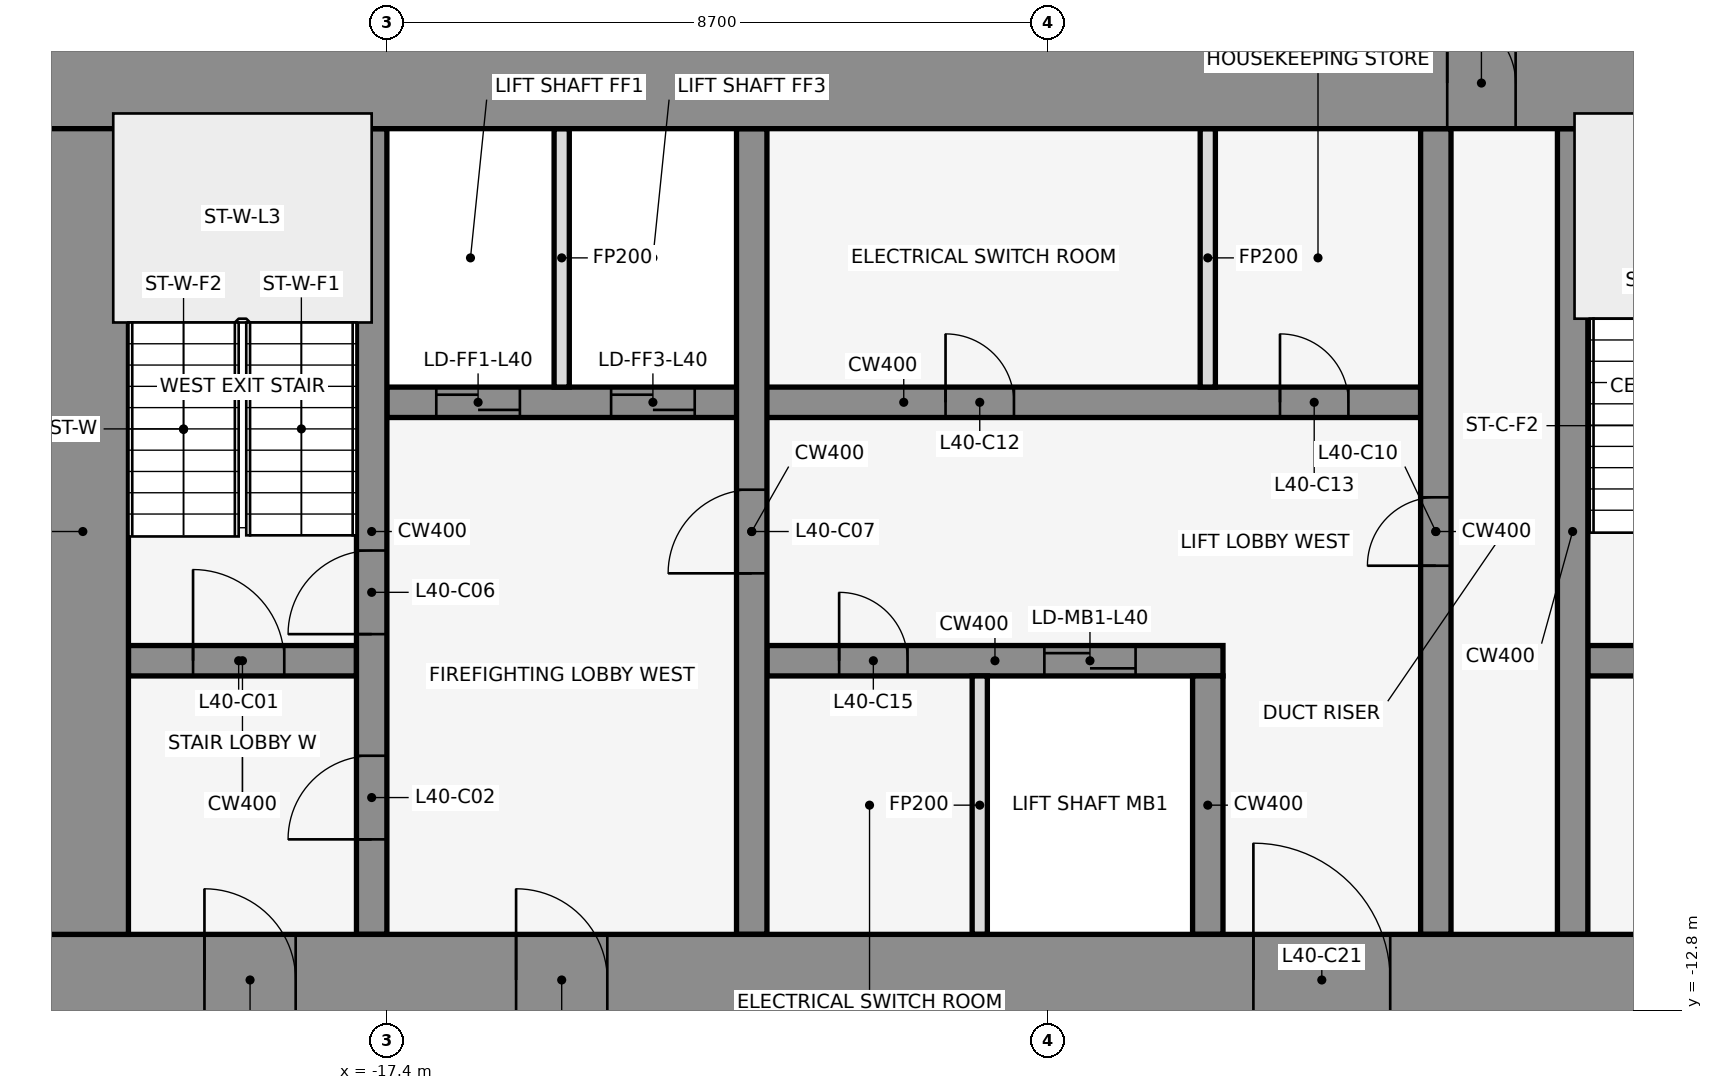
"""IFC4 building model, lengths in metres.
Left out: names, types, materials, properties, quantities, classifications, styles, units other than length and angle.
Written with IfcOpenShell. Run it as: python <this file> out.ifc"""

import sys

from ifc_helpers import new_model, si_unit, direction, frame, frame_2d, origin, place, context, subcontext, project, spatial, rectangle, extrude, element, fill, save


model = new_model("IFC4")
c1 = context("Model", 3, precision=1e-05, world=origin(), true_north=direction((0.0, 1.0)))
c2 = subcontext(c1, "Body", "Model", "MODEL_VIEW")
j1 = project(units=[si_unit("LENGTHUNIT", "METRE"), si_unit("PLANEANGLEUNIT", "RADIAN")], contexts=[c1])
p1 = place(None, origin())
s1 = spatial("IfcSite", under=j1, at=p1, CompositionType="ELEMENT")
p2 = place(p1, origin())
s2 = spatial("IfcBuilding", under=s1, at=p2, CompositionType="ELEMENT")
p3 = place(p2, frame((0.0, 0.0, 181.4)))
s3 = spatial("IfcBuildingStorey", under=s2, at=p3, CompositionType="ELEMENT", Elevation=181.4)
for number, where, z_axis, x_axis in (
    (1, (-0.068, -0.105, 0.0), (0.0, 0.0, 1.0), (-0.84, 0.543, 0.0)),
    (2, (-14.599, 1.08, 0.0), (0.0, 0.0, 1.0), (-0.84, -0.543, 0.0)),
):
    element("IfcWall", number, at=place(p3, frame(where, z_axis=z_axis, x_axis=x_axis)), inside=s3, PredefinedType="STANDARD", context=c2, shape_type="SweptSolid", body=[
        extrude(rectangle(XDim=2.183, YDim=0.25, at=frame_2d((1.091, 0.0))), origin(), (0.0, 0.0, 1.0), 3.9),
    ])
p4 = place(p3, frame((-20.8, -8.2, 0.0), z_axis=(0.0, 0.0, 1.0), x_axis=(1.0, 0.0, 0.0)))
e3 = element("IfcWall", 3, at=p4, inside=s3, PredefinedType="SHEAR", context=c2, shape_type="SweptSolid", body=[
    extrude(rectangle(XDim=3.0, YDim=0.4, at=frame_2d((1.5, 0.0))), origin(), (0.0, 0.0, 1.0), 4.1),
])
p5 = place(p4, frame((0.85, 0.0, 0.0)))
e4 = element("IfcOpeningElement", 4, at=p5, cuts=e3, PredefinedType="OPENING", context=c2, shape_type="SweptSolid", body=[
    extrude(rectangle(XDim=1.2, YDim=2.1, at=frame_2d((0.6, 1.05))), frame((0.0, 0.212, 0.0), z_axis=(0.0, -1.0, 0.0), x_axis=(1.0, 0.0, 0.0)), (0.0, 0.0, 1.0), 0.424),
])
p6 = place(p3, frame((-12.4, -8.2, 0.0), z_axis=(0.0, 0.0, 1.0), x_axis=(1.0, 0.0, 0.0)))
e5 = element("IfcWall", 5, at=p6, inside=s3, PredefinedType="SHEAR", context=c2, shape_type="SweptSolid", body=[
    extrude(rectangle(XDim=6.0, YDim=0.4, at=frame_2d((3.0, 0.0))), origin(), (0.0, 0.0, 1.0), 4.1),
])
p7 = place(p6, frame((3.65, 0.0, 0.0)))
e6 = element("IfcOpeningElement", 6, at=p7, cuts=e5, PredefinedType="OPENING", context=c2, shape_type="SweptSolid", body=[
    extrude(rectangle(XDim=1.2, YDim=2.1, at=frame_2d((0.6, 1.05))), frame((0.0, 0.212, 0.0), z_axis=(0.0, -1.0, 0.0), x_axis=(1.0, 0.0, 0.0)), (0.0, 0.0, 1.0), 0.424),
])
p8 = place(p6, frame((0.95, 0.0, 0.0)))
e7 = element("IfcOpeningElement", 7, at=p8, cuts=e5, PredefinedType="OPENING", context=c2, shape_type="SweptSolid", body=[
    extrude(rectangle(XDim=0.9, YDim=2.1, at=frame_2d((0.45, 1.05))), frame((0.0, 0.212, 0.0), z_axis=(0.0, -1.0, 0.0), x_axis=(1.0, 0.0, 0.0)), (0.0, 0.0, 1.0), 0.424),
])
p9 = place(p3, frame((-1.6, -8.2, 0.0), z_axis=(0.0, 0.0, 1.0), x_axis=(1.0, 0.0, 0.0)))
e8 = element("IfcWall", 8, at=p9, inside=s3, PredefinedType="SHEAR", context=c2, shape_type="SweptSolid", body=[
    extrude(rectangle(XDim=3.2, YDim=0.4, at=frame_2d((1.6, 0.0))), origin(), (0.0, 0.0, 1.0), 4.1),
])
p10 = place(p9, frame((1.05, 0.0, 0.0)))
e9 = element("IfcOpeningElement", 9, at=p10, cuts=e8, PredefinedType="OPENING", context=c2, shape_type="SweptSolid", body=[
    extrude(rectangle(XDim=1.2, YDim=2.1, at=frame_2d((0.6, 1.05))), frame((0.0, 0.212, 0.0), z_axis=(0.0, -1.0, 0.0), x_axis=(1.0, 0.0, 0.0)), (0.0, 0.0, 1.0), 0.424),
])
p11 = place(p3, frame((-17.4, -4.8, 0.0), z_axis=(0.0, 0.0, 1.0), x_axis=(1.0, 0.0, 0.0)))
e10 = element("IfcWall", 10, at=p11, inside=s3, PredefinedType="SHEAR", context=c2, shape_type="SweptSolid", body=[
    extrude(rectangle(XDim=13.6, YDim=0.4, at=frame_2d((6.8, 0.0))), origin(), (0.0, 0.0, 1.0), 4.1),
])
p12 = place(p11, frame((0.65, 0.0, 0.0)))
e11 = element("IfcOpeningElement", 11, at=p12, cuts=e10, PredefinedType="OPENING", context=c2, shape_type="SweptSolid", body=[
    extrude(rectangle(XDim=1.1, YDim=2.1, at=frame_2d((0.55, 1.05))), frame((0.0, 0.212, 0.0), z_axis=(0.0, -1.0, 0.0), x_axis=(1.0, 0.0, 0.0)), (0.0, 0.0, 1.0), 0.424),
])
p13 = place(p11, frame((2.95, 0.0, 0.0)))
e12 = element("IfcOpeningElement", 12, at=p13, cuts=e10, PredefinedType="OPENING", context=c2, shape_type="SweptSolid", body=[
    extrude(rectangle(XDim=1.1, YDim=2.1, at=frame_2d((0.55, 1.05))), frame((0.0, 0.212, 0.0), z_axis=(0.0, -1.0, 0.0), x_axis=(1.0, 0.0, 0.0)), (0.0, 0.0, 1.0), 0.424),
])
p14 = place(p11, frame((7.35, 0.0, 0.0)))
e13 = element("IfcOpeningElement", 13, at=p14, cuts=e10, PredefinedType="OPENING", context=c2, shape_type="SweptSolid", body=[
    extrude(rectangle(XDim=0.9, YDim=2.1, at=frame_2d((0.45, 1.05))), frame((0.0, 0.212, 0.0), z_axis=(0.0, -1.0, 0.0), x_axis=(1.0, 0.0, 0.0)), (0.0, 0.0, 1.0), 0.424),
])
p15 = place(p11, frame((11.75, 0.0, 0.0)))
e14 = element("IfcOpeningElement", 14, at=p15, cuts=e10, PredefinedType="OPENING", context=c2, shape_type="SweptSolid", body=[
    extrude(rectangle(XDim=0.9, YDim=2.1, at=frame_2d((0.45, 1.05))), frame((0.0, 0.212, 0.0), z_axis=(0.0, -1.0, 0.0), x_axis=(1.0, 0.0, 0.0)), (0.0, 0.0, 1.0), 0.424),
])
p16 = place(p3, frame((-17.6, -11.8, 0.0), z_axis=(0.0, 0.0, 1.0), x_axis=(0.0, 1.0, 0.0)))
e15 = element("IfcWall", 15, at=p16, inside=s3, PredefinedType="SHEAR", context=c2, shape_type="SweptSolid", body=[
    extrude(rectangle(XDim=10.6, YDim=0.4, at=frame_2d((5.3, 0.0))), origin(), (0.0, 0.0, 1.0), 4.1),
])
p17 = place(p16, frame((1.25, 0.0, 0.0)))
e16 = element("IfcOpeningElement", 16, at=p17, cuts=e15, PredefinedType="OPENING", context=c2, shape_type="SweptSolid", body=[
    extrude(rectangle(XDim=1.1, YDim=2.1, at=frame_2d((0.55, 1.05))), frame((0.0, 0.212, 0.0), z_axis=(0.0, -1.0, 0.0), x_axis=(1.0, 0.0, 0.0)), (0.0, 0.0, 1.0), 0.424),
])
p18 = place(p16, frame((3.95, 0.0, 0.0)))
e17 = element("IfcOpeningElement", 17, at=p18, cuts=e15, PredefinedType="OPENING", context=c2, shape_type="SweptSolid", body=[
    extrude(rectangle(XDim=1.1, YDim=2.1, at=frame_2d((0.55, 1.05))), frame((0.0, 0.212, 0.0), z_axis=(0.0, -1.0, 0.0), x_axis=(1.0, 0.0, 0.0)), (0.0, 0.0, 1.0), 0.424),
])
p19 = place(p3, frame((-15.1, -4.6, 0.0), z_axis=(0.0, 0.0, 1.0), x_axis=(0.0, 1.0, 0.0)))
e18 = element("IfcWall", 18, at=p19, inside=s3, PredefinedType="PARTITIONING", context=c2, shape_type="SweptSolid", body=[
    extrude(rectangle(XDim=3.4, YDim=0.2, at=frame_2d((1.7, 0.0))), origin(), (0.0, 0.0, 1.0), 2.79),
])
p20 = place(p3, frame((-12.6, -11.8, 0.0), z_axis=(0.0, 0.0, 1.0), x_axis=(0.0, 1.0, 0.0)))
e19 = element("IfcWall", 19, at=p20, inside=s3, PredefinedType="SHEAR", context=c2, shape_type="SweptSolid", body=[
    extrude(rectangle(XDim=10.6, YDim=0.4, at=frame_2d((5.3, 0.0))), origin(), (0.0, 0.0, 1.0), 4.1),
])
p21 = place(p20, frame((4.75, 0.0, 0.0)))
e20 = element("IfcOpeningElement", 20, at=p21, cuts=e19, PredefinedType="OPENING", context=c2, shape_type="SweptSolid", body=[
    extrude(rectangle(XDim=1.1, YDim=2.1, at=frame_2d((0.55, 1.05))), frame((0.0, 0.212, 0.0), z_axis=(0.0, -1.0, 0.0), x_axis=(1.0, 0.0, 0.0)), (0.0, 0.0, 1.0), 0.424),
])
p22 = place(p3, frame((-9.6, -11.8, 0.0), z_axis=(0.0, 0.0, 1.0), x_axis=(0.0, 1.0, 0.0)))
e21 = element("IfcWall", 21, at=p22, inside=s3, PredefinedType="PARTITIONING", context=c2, shape_type="SweptSolid", body=[
    extrude(rectangle(XDim=3.4, YDim=0.2, at=frame_2d((1.7, 0.0))), origin(), (0.0, 0.0, 1.0), 2.79),
])
p23 = place(p3, frame((-6.6, -11.8, 0.0), z_axis=(0.0, 0.0, 1.0), x_axis=(0.0, 1.0, 0.0)))
e22 = element("IfcWall", 22, at=p23, inside=s3, PredefinedType="SHEAR", context=c2, shape_type="SweptSolid", body=[
    extrude(rectangle(XDim=3.4, YDim=0.4, at=frame_2d((1.7, 0.0))), origin(), (0.0, 0.0, 1.0), 4.1),
])
p24 = place(p3, frame((-6.6, -4.6, 0.0), z_axis=(0.0, 0.0, 1.0), x_axis=(0.0, 1.0, 0.0)))
e23 = element("IfcWall", 23, at=p24, inside=s3, PredefinedType="PARTITIONING", context=c2, shape_type="SweptSolid", body=[
    extrude(rectangle(XDim=3.4, YDim=0.2, at=frame_2d((1.7, 0.0))), origin(), (0.0, 0.0, 1.0), 2.79),
])
p25 = place(p3, frame((-3.6, -11.8, 0.0), z_axis=(0.0, 0.0, 1.0), x_axis=(0.0, 1.0, 0.0)))
e24 = element("IfcWall", 24, at=p25, inside=s3, PredefinedType="SHEAR", context=c2, shape_type="SweptSolid", body=[
    extrude(rectangle(XDim=10.6, YDim=0.4, at=frame_2d((5.3, 0.0))), origin(), (0.0, 0.0, 1.0), 4.1),
])
p26 = place(p25, frame((4.85, 0.0, 0.0)))
e25 = element("IfcOpeningElement", 25, at=p26, cuts=e24, PredefinedType="OPENING", context=c2, shape_type="SweptSolid", body=[
    extrude(rectangle(XDim=0.9, YDim=2.1, at=frame_2d((0.45, 1.05))), frame((0.0, 0.212, 0.0), z_axis=(0.0, -1.0, 0.0), x_axis=(1.0, 0.0, 0.0)), (0.0, 0.0, 1.0), 0.424),
])
p27 = place(p3, frame((-1.8, -11.8, 0.0), z_axis=(0.0, 0.0, 1.0), x_axis=(0.0, 1.0, 0.0)))
e26 = element("IfcWall", 26, at=p27, inside=s3, PredefinedType="SHEAR", context=c2, shape_type="SweptSolid", body=[
    extrude(rectangle(XDim=10.6, YDim=0.4, at=frame_2d((5.3, 0.0))), origin(), (0.0, 0.0, 1.0), 4.1),
])
p28 = place(p3, frame((-22.0, -0.6, 0.0), z_axis=(0.0, 0.0, 1.0), x_axis=(1.0, 0.0, 0.0)))
e27 = element("IfcWall", 27, at=p28, inside=s3, PredefinedType="SHEAR", context=c2, shape_type="SweptSolid", body=[
    extrude(rectangle(XDim=44.0, YDim=1.2, at=frame_2d((22.0, 0.0))), origin(), (0.0, 0.0, 1.0), 4.1),
])
p29 = place(p28, frame((18.55, 0.0, 0.0)))
e28 = element("IfcOpeningElement", 28, at=p29, cuts=e27, PredefinedType="OPENING", context=c2, shape_type="SweptSolid", body=[
    extrude(rectangle(XDim=0.9, YDim=2.1, at=frame_2d((0.45, 1.05))), frame((0.0, 0.612, 0.0), z_axis=(0.0, -1.0, 0.0), x_axis=(1.0, 0.0, 0.0)), (0.0, 0.0, 1.0), 1.224),
])
p30 = place(p28, frame((24.55, 0.0, 0.0)))
e29 = element("IfcOpeningElement", 29, at=p30, cuts=e27, PredefinedType="OPENING", context=c2, shape_type="SweptSolid", body=[
    extrude(rectangle(XDim=0.9, YDim=2.1, at=frame_2d((0.45, 1.05))), frame((0.0, 0.612, 0.0), z_axis=(0.0, -1.0, 0.0), x_axis=(1.0, 0.0, 0.0)), (0.0, 0.0, 1.0), 1.224),
])
p31 = place(p3, frame((-22.0, -12.4, 0.0), z_axis=(0.0, 0.0, 1.0), x_axis=(1.0, 0.0, 0.0)))
e30 = element("IfcWall", 30, at=p31, inside=s3, PredefinedType="SHEAR", context=c2, shape_type="SweptSolid", body=[
    extrude(rectangle(XDim=44.0, YDim=1.2, at=frame_2d((22.0, 0.0))), origin(), (0.0, 0.0, 1.0), 4.1),
])
p32 = place(p31, frame((2.2, 0.0, 0.0)))
e31 = element("IfcOpeningElement", 31, at=p32, cuts=e30, PredefinedType="OPENING", context=c2, shape_type="SweptSolid", body=[
    extrude(rectangle(XDim=1.2, YDim=2.1, at=frame_2d((0.6, 1.05))), frame((0.0, 0.612, 0.0), z_axis=(0.0, -1.0, 0.0), x_axis=(1.0, 0.0, 0.0)), (0.0, 0.0, 1.0), 1.224),
])
p33 = place(p31, frame((21.4, 0.0, 0.0)))
e32 = element("IfcOpeningElement", 32, at=p33, cuts=e30, PredefinedType="OPENING", context=c2, shape_type="SweptSolid", body=[
    extrude(rectangle(XDim=1.2, YDim=2.1, at=frame_2d((0.6, 1.05))), frame((0.0, 0.612, 0.0), z_axis=(0.0, -1.0, 0.0), x_axis=(1.0, 0.0, 0.0)), (0.0, 0.0, 1.0), 1.224),
])
p34 = place(p31, frame((40.6, 0.0, 0.0)))
e33 = element("IfcOpeningElement", 33, at=p34, cuts=e30, PredefinedType="OPENING", context=c2, shape_type="SweptSolid", body=[
    extrude(rectangle(XDim=1.2, YDim=2.1, at=frame_2d((0.6, 1.05))), frame((0.0, 0.612, 0.0), z_axis=(0.0, -1.0, 0.0), x_axis=(1.0, 0.0, 0.0)), (0.0, 0.0, 1.0), 1.224),
])
p35 = place(p31, frame((16.0, 0.0, 0.0)))
e34 = element("IfcOpeningElement", 34, at=p35, cuts=e30, PredefinedType="OPENING", context=c2, shape_type="SweptSolid", body=[
    extrude(rectangle(XDim=1.8, YDim=2.1, at=frame_2d((0.9, 1.05))), frame((0.0, 0.612, 0.0), z_axis=(0.0, -1.0, 0.0), x_axis=(1.0, 0.0, 0.0)), (0.0, 0.0, 1.0), 1.224),
])
p36 = place(p31, frame((6.3, 0.0, 0.0)))
e35 = element("IfcOpeningElement", 35, at=p36, cuts=e30, PredefinedType="OPENING", context=c2, shape_type="SweptSolid", body=[
    extrude(rectangle(XDim=1.2, YDim=2.1, at=frame_2d((0.6, 1.05))), frame((0.0, 0.612, 0.0), z_axis=(0.0, -1.0, 0.0), x_axis=(1.0, 0.0, 0.0)), (0.0, 0.0, 1.0), 1.224),
])
p37 = place(p31, frame((26.2, 0.0, 0.0)))
e36 = element("IfcOpeningElement", 36, at=p37, cuts=e30, PredefinedType="OPENING", context=c2, shape_type="SweptSolid", body=[
    extrude(rectangle(XDim=1.8, YDim=2.1, at=frame_2d((0.9, 1.05))), frame((0.0, 0.612, 0.0), z_axis=(0.0, -1.0, 0.0), x_axis=(1.0, 0.0, 0.0)), (0.0, 0.0, 1.0), 1.224),
])
p38 = place(p31, frame((36.5, 0.0, 0.0)))
e37 = element("IfcOpeningElement", 37, at=p38, cuts=e30, PredefinedType="OPENING", context=c2, shape_type="SweptSolid", body=[
    extrude(rectangle(XDim=1.2, YDim=2.1, at=frame_2d((0.6, 1.05))), frame((0.0, 0.612, 0.0), z_axis=(0.0, -1.0, 0.0), x_axis=(1.0, 0.0, 0.0)), (0.0, 0.0, 1.0), 1.224),
])
p39 = place(p3, frame((-21.4, -11.8, 0.0), z_axis=(0.0, 0.0, 1.0), x_axis=(0.0, 1.0, 0.0)))
e38 = element("IfcWall", 38, at=p39, inside=s3, PredefinedType="SHEAR", context=c2, shape_type="SweptSolid", body=[
    extrude(rectangle(XDim=10.6, YDim=1.2, at=frame_2d((5.3, 0.0))), origin(), (0.0, 0.0, 1.0), 4.1),
])
p40 = place(p5, origin())
e39 = element("IfcDoor", 39, at=p40, inside=s3, OperationType="SINGLE_SWING_LEFT", PredefinedType="DOOR", context=c2, shape_type="SweptSolid", body=[
    extrude(rectangle(XDim=1.2, YDim=2.1, at=frame_2d((0.6, 1.05))), frame((0.0, 0.025, 0.0), z_axis=(0.0, -1.0, 0.0), x_axis=(1.0, 0.0, 0.0)), (0.0, 0.0, 1.0), 0.05),
])
fill(e4, e39)
p41 = place(p17, frame((1.1, 0.0, 0.0), z_axis=(0.0, 0.0, 1.0), x_axis=(-1.0, 0.0, 0.0)))
e40 = element("IfcDoor", 40, at=p41, inside=s3, OperationType="SINGLE_SWING_LEFT", PredefinedType="DOOR", context=c2, shape_type="SweptSolid", body=[
    extrude(rectangle(XDim=1.1, YDim=2.1, at=frame_2d((0.55, 1.05))), frame((0.0, 0.025, 0.0), z_axis=(0.0, -1.0, 0.0), x_axis=(1.0, 0.0, 0.0)), (0.0, 0.0, 1.0), 0.05),
])
fill(e16, e40)
p42 = place(p12, origin())
e41 = element("IfcDoor", 41, at=p42, inside=s3, OperationType="DOUBLE_DOOR_SLIDING", PredefinedType="DOOR", context=c2, shape_type="SweptSolid", body=[
    extrude(rectangle(XDim=1.1, YDim=2.1, at=frame_2d((0.55, 1.05))), frame((0.0, 0.025, 0.0), z_axis=(0.0, -1.0, 0.0), x_axis=(1.0, 0.0, 0.0)), (0.0, 0.0, 1.0), 0.05),
])
fill(e11, e41)
p43 = place(p13, origin())
e42 = element("IfcDoor", 42, at=p43, inside=s3, OperationType="DOUBLE_DOOR_SLIDING", PredefinedType="DOOR", context=c2, shape_type="SweptSolid", body=[
    extrude(rectangle(XDim=1.1, YDim=2.1, at=frame_2d((0.55, 1.05))), frame((0.0, 0.025, 0.0), z_axis=(0.0, -1.0, 0.0), x_axis=(1.0, 0.0, 0.0)), (0.0, 0.0, 1.0), 0.05),
])
fill(e12, e42)
p44 = place(p7, origin())
e43 = element("IfcDoor", 43, at=p44, inside=s3, OperationType="DOUBLE_DOOR_SLIDING", PredefinedType="DOOR", context=c2, shape_type="SweptSolid", body=[
    extrude(rectangle(XDim=1.2, YDim=2.1, at=frame_2d((0.6, 1.05))), frame((0.0, 0.025, 0.0), z_axis=(0.0, -1.0, 0.0), x_axis=(1.0, 0.0, 0.0)), (0.0, 0.0, 1.0), 0.05),
])
fill(e6, e43)
p45 = place(p18, frame((1.1, 0.0, 0.0), z_axis=(0.0, 0.0, 1.0), x_axis=(-1.0, 0.0, 0.0)))
e44 = element("IfcDoor", 44, at=p45, inside=s3, OperationType="SINGLE_SWING_LEFT", PredefinedType="DOOR", context=c2, shape_type="SweptSolid", body=[
    extrude(rectangle(XDim=1.1, YDim=2.1, at=frame_2d((0.55, 1.05))), frame((0.0, 0.025, 0.0), z_axis=(0.0, -1.0, 0.0), x_axis=(1.0, 0.0, 0.0)), (0.0, 0.0, 1.0), 0.05),
])
fill(e17, e44)
p46 = place(p21, origin())
e45 = element("IfcDoor", 45, at=p46, inside=s3, OperationType="SINGLE_SWING_LEFT", PredefinedType="DOOR", context=c2, shape_type="SweptSolid", body=[
    extrude(rectangle(XDim=1.1, YDim=2.1, at=frame_2d((0.55, 1.05))), frame((0.0, 0.025, 0.0), z_axis=(0.0, -1.0, 0.0), x_axis=(1.0, 0.0, 0.0)), (0.0, 0.0, 1.0), 0.05),
])
fill(e20, e45)
p47 = place(p26, frame((0.9, 0.0, 0.0), z_axis=(0.0, 0.0, 1.0), x_axis=(-1.0, 0.0, 0.0)))
e46 = element("IfcDoor", 46, at=p47, inside=s3, OperationType="SINGLE_SWING_LEFT", PredefinedType="DOOR", context=c2, shape_type="SweptSolid", body=[
    extrude(rectangle(XDim=0.9, YDim=2.1, at=frame_2d((0.45, 1.05))), frame((0.0, 0.025, 0.0), z_axis=(0.0, -1.0, 0.0), x_axis=(1.0, 0.0, 0.0)), (0.0, 0.0, 1.0), 0.05),
])
fill(e25, e46)
p48 = place(p14, origin())
e47 = element("IfcDoor", 47, at=p48, inside=s3, OperationType="SINGLE_SWING_RIGHT", PredefinedType="DOOR", context=c2, shape_type="SweptSolid", body=[
    extrude(rectangle(XDim=0.9, YDim=2.1, at=frame_2d((0.45, 1.05))), frame((0.0, 0.025, 0.0), z_axis=(0.0, -1.0, 0.0), x_axis=(1.0, 0.0, 0.0)), (0.0, 0.0, 1.0), 0.05),
])
fill(e13, e47)
p49 = place(p15, origin())
e48 = element("IfcDoor", 48, at=p49, inside=s3, OperationType="SINGLE_SWING_LEFT", PredefinedType="DOOR", context=c2, shape_type="SweptSolid", body=[
    extrude(rectangle(XDim=0.9, YDim=2.1, at=frame_2d((0.45, 1.05))), frame((0.0, 0.025, 0.0), z_axis=(0.0, -1.0, 0.0), x_axis=(1.0, 0.0, 0.0)), (0.0, 0.0, 1.0), 0.05),
])
fill(e14, e48)
p50 = place(p8, frame((0.9, 0.0, 0.0), z_axis=(0.0, 0.0, 1.0), x_axis=(-1.0, 0.0, 0.0)))
e49 = element("IfcDoor", 49, at=p50, inside=s3, OperationType="SINGLE_SWING_RIGHT", PredefinedType="DOOR", context=c2, shape_type="SweptSolid", body=[
    extrude(rectangle(XDim=0.9, YDim=2.1, at=frame_2d((0.45, 1.05))), frame((0.0, 0.025, 0.0), z_axis=(0.0, -1.0, 0.0), x_axis=(1.0, 0.0, 0.0)), (0.0, 0.0, 1.0), 0.05),
])
fill(e7, e49)
p51 = place(p29, origin())
e50 = element("IfcDoor", 50, at=p51, inside=s3, OperationType="SINGLE_SWING_LEFT", PredefinedType="DOOR", context=c2, shape_type="SweptSolid", body=[
    extrude(rectangle(XDim=0.9, YDim=2.1, at=frame_2d((0.45, 1.05))), frame((0.0, 0.025, 0.0), z_axis=(0.0, -1.0, 0.0), x_axis=(1.0, 0.0, 0.0)), (0.0, 0.0, 1.0), 0.05),
])
fill(e28, e50)
p52 = place(p32, frame((1.2, 0.0, 0.0), z_axis=(0.0, 0.0, 1.0), x_axis=(-1.0, 0.0, 0.0)))
e51 = element("IfcDoor", 51, at=p52, inside=s3, OperationType="SINGLE_SWING_RIGHT", PredefinedType="DOOR", context=c2, shape_type="SweptSolid", body=[
    extrude(rectangle(XDim=1.2, YDim=2.1, at=frame_2d((0.6, 1.05))), frame((0.0, 0.025, 0.0), z_axis=(0.0, -1.0, 0.0), x_axis=(1.0, 0.0, 0.0)), (0.0, 0.0, 1.0), 0.05),
])
fill(e31, e51)
p53 = place(p35, origin())
e52 = element("IfcDoor", 52, at=p53, inside=s3, OperationType="SINGLE_SWING_LEFT", PredefinedType="DOOR", context=c2, shape_type="SweptSolid", body=[
    extrude(rectangle(XDim=1.8, YDim=2.1, at=frame_2d((0.9, 1.05))), frame((0.0, 0.025, 0.0), z_axis=(0.0, -1.0, 0.0), x_axis=(1.0, 0.0, 0.0)), (0.0, 0.0, 1.0), 0.05),
])
fill(e34, e52)
p54 = place(p36, frame((1.2, 0.0, 0.0), z_axis=(0.0, 0.0, 1.0), x_axis=(-1.0, 0.0, 0.0)))
e53 = element("IfcDoor", 53, at=p54, inside=s3, OperationType="SINGLE_SWING_RIGHT", PredefinedType="DOOR", context=c2, shape_type="SweptSolid", body=[
    extrude(rectangle(XDim=1.2, YDim=2.1, at=frame_2d((0.6, 1.05))), frame((0.0, 0.025, 0.0), z_axis=(0.0, -1.0, 0.0), x_axis=(1.0, 0.0, 0.0)), (0.0, 0.0, 1.0), 0.05),
])
fill(e35, e53)
save(model, sys.argv[1])
